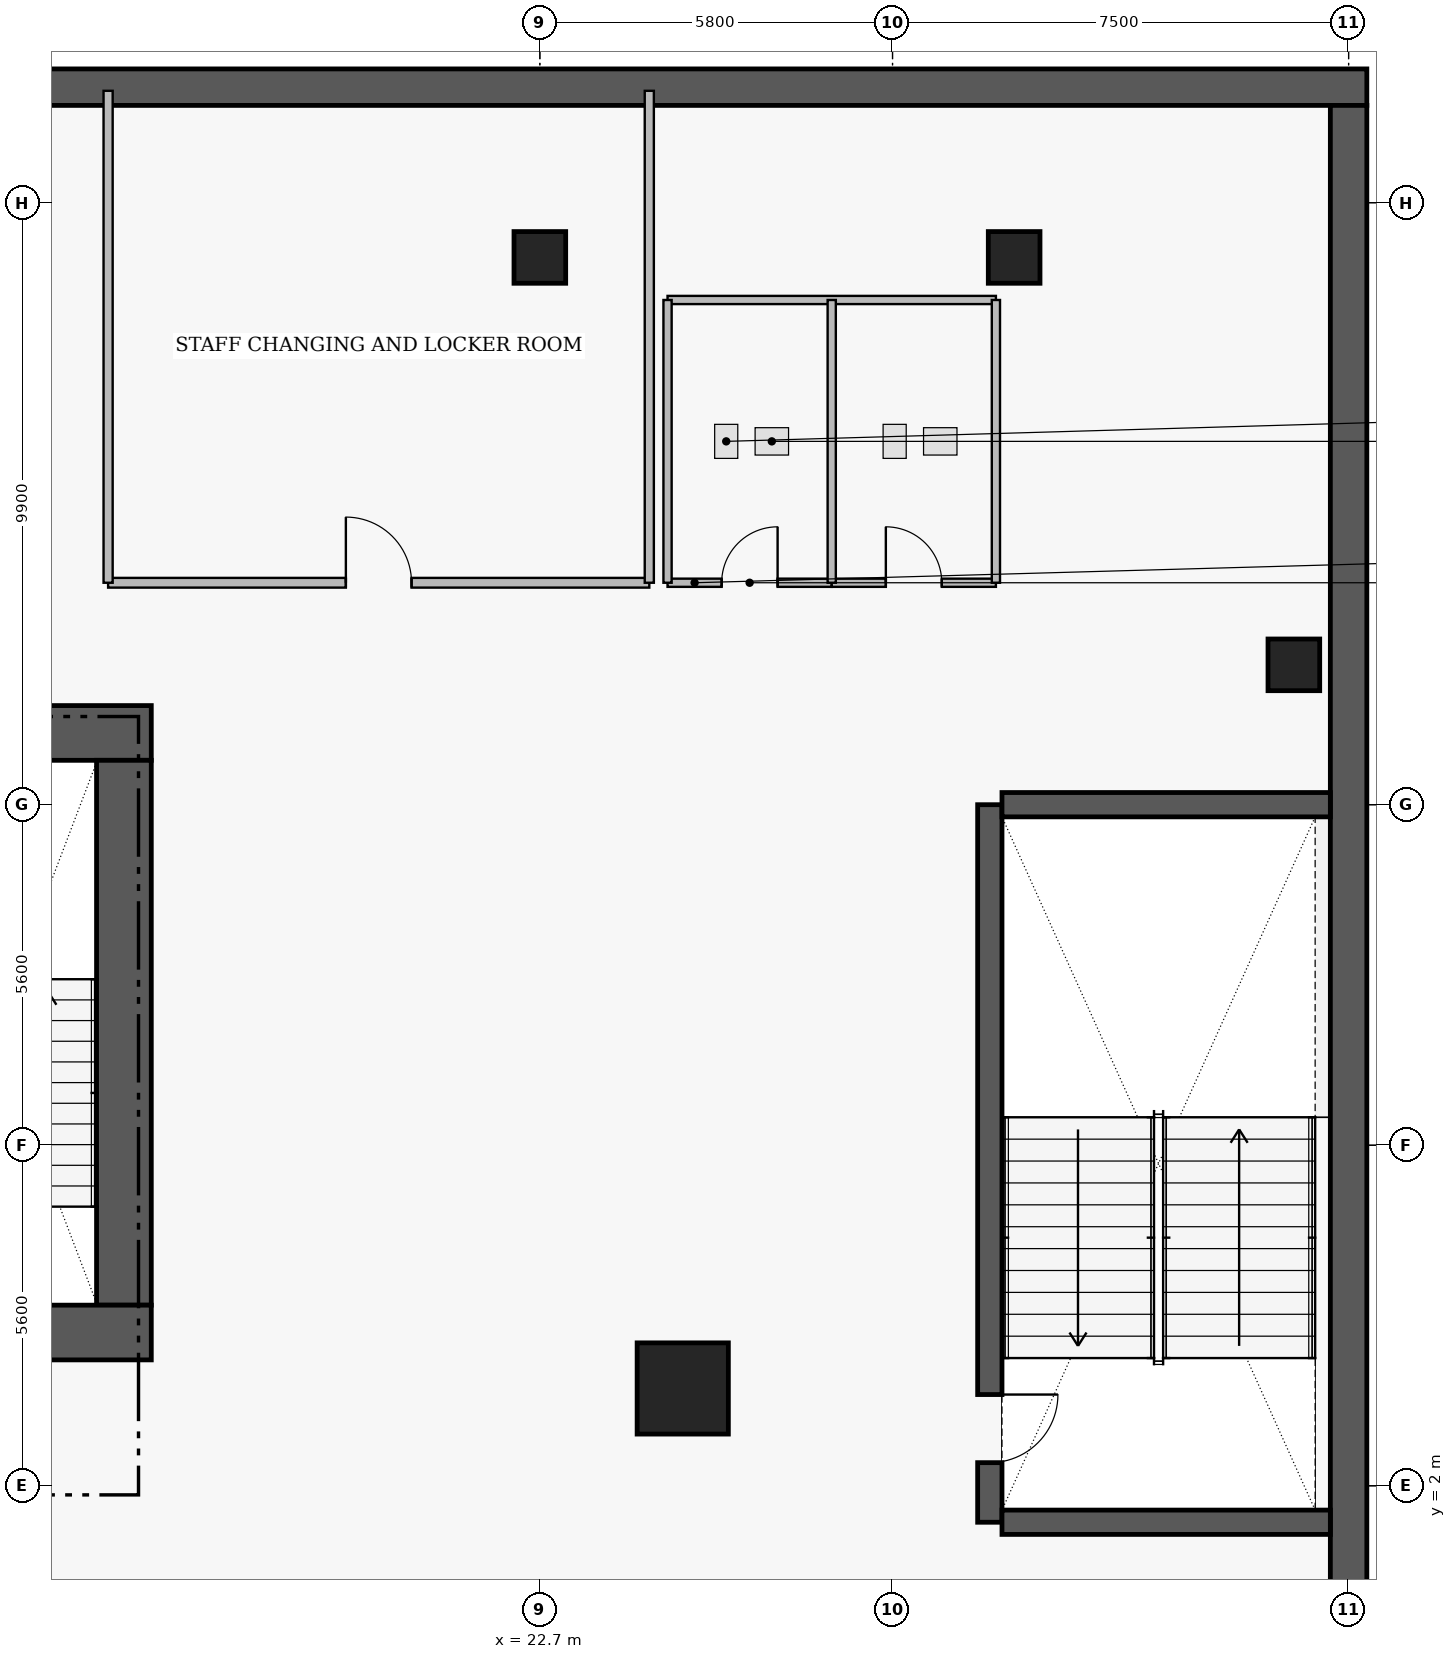
"""IFC4 building model, lengths in metres.
Left out: names, types, materials, properties, quantities, classifications, styles, units other than length and angle.
Written with IfcOpenShell. Run it as: python <this file> out.ifc"""

import sys

from ifc_helpers import new_model, si_unit, direction, frame, frame_2d, origin, origin_2d, place, context, subcontext, project, spatial, rectangle, extrude, element, fill, save


model = new_model("IFC4")
c1 = context("Model", 3, precision=1e-05, world=origin(), true_north=direction((0.0, 1.0)))
c2 = subcontext(c1, "Body", "Model", "MODEL_VIEW")
j1 = project(units=[si_unit("LENGTHUNIT", "METRE"), si_unit("PLANEANGLEUNIT", "RADIAN")], contexts=[c1])
p1 = place(None, origin())
s1 = spatial("IfcSite", under=j1, at=p1, CompositionType="ELEMENT")
p2 = place(p1, origin())
s2 = spatial("IfcBuilding", under=s1, at=p2, CompositionType="ELEMENT")
p3 = place(p2, frame((0.0, 0.0, -4.5)))
s3 = spatial("IfcBuildingStorey", under=s2, at=p3, CompositionType="ELEMENT", Elevation=-4.5)
p4 = place(p3, frame((-36.3, 25.0, 0.0), z_axis=(0.0, 0.0, 1.0), x_axis=(1.0, 0.0, 0.0)))
e1 = element("IfcWall", 1, at=p4, inside=s3, PredefinedType="USERDEFINED", context=c2, shape_type="SweptSolid", body=[
    extrude(rectangle(XDim=72.6, YDim=0.6, at=frame_2d((36.3, 0.0))), origin(), (0.0, 0.0, 1.0), 4.24),
])
p5 = place(p3, frame((36.0, 24.7, 0.0), z_axis=(0.0, 0.0, 1.0), x_axis=(0.0, -1.0, 0.0)))
e2 = element("IfcWall", 2, at=p5, inside=s3, PredefinedType="USERDEFINED", context=c2, shape_type="SweptSolid", body=[
    extrude(rectangle(XDim=48.4, YDim=0.6, at=frame_2d((24.2, 0.0))), origin(), (0.0, 0.0, 1.0), 4.24),
])
p6 = place(p3, frame((11.6, 14.38, 0.0), z_axis=(0.0, 0.0, 1.0), x_axis=(1.0, 0.0, 0.0)))
e3 = element("IfcWall", 3, at=p6, inside=s3, PredefinedType="SHEAR", context=c2, shape_type="SweptSolid", body=[
    extrude(rectangle(XDim=4.71, YDim=0.9, at=frame_2d((2.355, 0.0))), origin(), (0.0, 0.0, 1.0), 4.31),
])
p7 = place(p3, frame((15.86, 4.97, 0.0), z_axis=(0.0, 0.0, 1.0), x_axis=(0.0, 1.0, 0.0)))
e4 = element("IfcWall", 4, at=p7, inside=s3, PredefinedType="SHEAR", context=c2, shape_type="SweptSolid", body=[
    extrude(rectangle(XDim=8.96, YDim=0.9, at=frame_2d((4.48, 0.0))), origin(), (0.0, 0.0, 1.0), 4.31),
])
p8 = place(p3, frame((11.6, 4.52, 0.0), z_axis=(0.0, 0.0, 1.0), x_axis=(1.0, 0.0, 0.0)))
e5 = element("IfcWall", 5, at=p8, inside=s3, PredefinedType="SHEAR", context=c2, shape_type="SweptSolid", body=[
    extrude(rectangle(XDim=4.71, YDim=0.9, at=frame_2d((2.355, 0.0))), origin(), (0.0, 0.0, 1.0), 4.31),
])
p9 = place(p3, frame((30.1, 13.2, 0.0), z_axis=(0.0, 0.0, 1.0), x_axis=(0.0, -1.0, 0.0)))
e6 = element("IfcWall", 6, at=p9, inside=s3, PredefinedType="SHEAR", context=c2, shape_type="SweptSolid", body=[
    extrude(rectangle(XDim=11.8, YDim=0.4, at=frame_2d((5.9, 0.0))), origin(), (0.0, 0.0, 1.0), 4.31),
])
p10 = place(p9, frame((9.7, 0.0, 0.0)))
e7 = element("IfcOpeningElement", 7, at=p10, cuts=e6, PredefinedType="OPENING", context=c2, shape_type="SweptSolid", body=[
    extrude(rectangle(XDim=1.12, YDim=2.22, at=frame_2d((0.56, 1.11))), frame((0.0, 0.21, 0.0), z_axis=(0.0, -1.0, 0.0), x_axis=(1.0, 0.0, 0.0)), (0.0, 0.0, 1.0), 0.42),
])
for number, where, z_axis, x_axis in (
    (8, (30.3, 1.4, 0.0), (0.0, 0.0, 1.0), (1.0, 0.0, 0.0)),
    (9, (30.3, 13.2, 0.0), (0.0, 0.0, 1.0), (1.0, 0.0, 0.0)),
):
    element("IfcWall", number, at=place(p3, frame(where, z_axis=z_axis, x_axis=x_axis)), inside=s3, PredefinedType="SHEAR", context=c2, shape_type="SweptSolid", body=[
        extrude(rectangle(XDim=5.4, YDim=0.4, at=frame_2d((2.7, 0.0))), origin(), (0.0, 0.0, 1.0), 4.31),
    ])
p11 = place(p3, frame((25.05, 3.6, 0.0), z_axis=(0.0, 0.0, 1.0), x_axis=(1.0, 0.0, 0.0)))
e10 = element("IfcColumn", 10, at=p11, inside=s3, PredefinedType="COLUMN", context=c2, shape_type="SweptSolid", body=[
    extrude(rectangle(XDim=1.5, YDim=1.5, at=origin_2d()), origin(), (0.0, 0.0, 1.0), 4.5),
])
for number, where, z_axis, x_axis in (
    (11, (30.5, 22.2, 0.0), (0.0, 0.0, 1.0), (1.0, 0.0, 0.0)),
    (12, (35.1, 15.5, 0.0), (0.0, 0.0, 1.0), (1.0, 0.0, 0.0)),
    (13, (22.7, 22.2, 0.0), (0.0, 0.0, 1.0), (1.0, 0.0, 0.0)),
):
    element("IfcColumn", number, at=place(p3, frame(where, z_axis=z_axis, x_axis=x_axis)), inside=s3, PredefinedType="COLUMN", context=c2, shape_type="SweptSolid", body=[
        extrude(rectangle(XDim=0.85, YDim=0.85, at=origin_2d()), origin(), (0.0, 0.0, 1.0), 4.5),
    ])
p12 = place(p3, frame((15.6, 16.85, 0.0), z_axis=(0.0, 0.0, 1.0), x_axis=(1.0, 0.0, 0.0)))
e14 = element("IfcWall", 14, at=p12, inside=s3, PredefinedType="PARTITIONING", context=c2, shape_type="SweptSolid", body=[
    extrude(rectangle(XDim=8.9, YDim=0.16, at=frame_2d((4.45, 0.0))), origin(), (0.0, 0.0, 1.0), 4.24),
])
p13 = place(p12, frame((3.91, 0.0, 0.0)))
e15 = element("IfcOpeningElement", 15, at=p13, cuts=e14, PredefinedType="OPENING", context=c2, shape_type="SweptSolid", body=[
    extrude(rectangle(XDim=1.08, YDim=2.18, at=frame_2d((0.54, 1.09))), frame((0.0, 0.09, 0.0), z_axis=(0.0, -1.0, 0.0), x_axis=(1.0, 0.0, 0.0)), (0.0, 0.0, 1.0), 0.18),
])
p14 = place(p3, frame((24.8, 16.85, 0.0), z_axis=(0.0, 0.0, 1.0), x_axis=(1.0, 0.0, 0.0)))
e16 = element("IfcWall", 16, at=p14, inside=s3, PredefinedType="PLUMBINGWALL", context=c2, shape_type="SweptSolid", body=[
    extrude(rectangle(XDim=2.7, YDim=0.135, at=frame_2d((1.35, 0.0))), origin(), (0.0, 0.0, 1.0), 4.24),
])
p15 = place(p14, frame((0.89, 0.0, 0.0)))
e17 = element("IfcOpeningElement", 17, at=p15, cuts=e16, PredefinedType="OPENING", context=c2, shape_type="SweptSolid", body=[
    extrude(rectangle(XDim=0.92, YDim=2.12, at=frame_2d((0.46, 1.06))), frame((0.0, 0.077, 0.0), z_axis=(0.0, -1.0, 0.0), x_axis=(1.0, 0.0, 0.0)), (0.0, 0.0, 1.0), 0.155),
])
p16 = place(p3, frame((27.5, 16.85, 0.0), z_axis=(0.0, 0.0, 1.0), x_axis=(1.0, 0.0, 0.0)))
e18 = element("IfcWall", 18, at=p16, inside=s3, PredefinedType="PLUMBINGWALL", context=c2, shape_type="SweptSolid", body=[
    extrude(rectangle(XDim=2.7, YDim=0.135, at=frame_2d((1.35, 0.0))), origin(), (0.0, 0.0, 1.0), 4.24),
])
p17 = place(p16, frame((0.89, 0.0, 0.0)))
e19 = element("IfcOpeningElement", 19, at=p17, cuts=e18, PredefinedType="OPENING", context=c2, shape_type="SweptSolid", body=[
    extrude(rectangle(XDim=0.92, YDim=2.12, at=frame_2d((0.46, 1.06))), frame((0.0, 0.077, 0.0), z_axis=(0.0, -1.0, 0.0), x_axis=(1.0, 0.0, 0.0)), (0.0, 0.0, 1.0), 0.155),
])
for number, where, z_axis, x_axis in (
    (20, (15.6, 16.85, 0.0), (0.0, 0.0, 1.0), (0.0, 1.0, 0.0)),
    (21, (24.5, 16.85, 0.0), (0.0, 0.0, 1.0), (0.0, 1.0, 0.0)),
):
    element("IfcWall", number, at=place(p3, frame(where, z_axis=z_axis, x_axis=x_axis)), inside=s3, PredefinedType="PARTITIONING", context=c2, shape_type="SweptSolid", body=[
        extrude(rectangle(XDim=8.09, YDim=0.15, at=frame_2d((4.045, 0.0))), origin(), (0.0, 0.0, 1.0), 4.24),
    ])
p18 = place(p3, frame((24.8, 21.5, 0.0), z_axis=(0.0, 0.0, 1.0), x_axis=(1.0, 0.0, 0.0)))
e22 = element("IfcWall", 22, at=p18, inside=s3, PredefinedType="PLUMBINGWALL", context=c2, shape_type="SweptSolid", body=[
    extrude(rectangle(XDim=5.4, YDim=0.135, at=frame_2d((2.7, 0.0))), origin(), (0.0, 0.0, 1.0), 4.24),
])
for number, where, z_axis, x_axis in (
    (23, (24.8, 16.85, 0.0), (0.0, 0.0, 1.0), (0.0, 1.0, 0.0)),
    (24, (30.2, 16.85, 0.0), (0.0, 0.0, 1.0), (0.0, 1.0, 0.0)),
    (25, (27.5, 16.85, 0.0), (0.0, 0.0, 1.0), (0.0, 1.0, 0.0)),
):
    element("IfcWall", number, at=place(p3, frame(where, z_axis=z_axis, x_axis=x_axis)), inside=s3, PredefinedType="PLUMBINGWALL", context=c2, shape_type="SweptSolid", body=[
        extrude(rectangle(XDim=4.65, YDim=0.135, at=frame_2d((2.325, 0.0))), origin(), (0.0, 0.0, 1.0), 4.24),
    ])
p19 = place(p10, origin())
e26 = element("IfcDoor", 26, at=p19, inside=s3, OperationType="SINGLE_SWING_LEFT", PredefinedType="DOOR", context=c2, shape_type="SweptSolid", body=[
    extrude(rectangle(XDim=1.12, YDim=2.22, at=frame_2d((0.56, 1.11))), frame((0.0, 0.025, 0.0), z_axis=(0.0, -1.0, 0.0), x_axis=(1.0, 0.0, 0.0)), (0.0, 0.0, 1.0), 0.05),
])
fill(e7, e26)
p20 = place(p13, origin())
e27 = element("IfcDoor", 27, at=p20, inside=s3, OperationType="SINGLE_SWING_LEFT", PredefinedType="DOOR", context=c2, shape_type="SweptSolid", body=[
    extrude(rectangle(XDim=1.08, YDim=2.18, at=frame_2d((0.54, 1.09))), frame((0.0, 0.025, 0.0), z_axis=(0.0, -1.0, 0.0), x_axis=(1.0, 0.0, 0.0)), (0.0, 0.0, 1.0), 0.05),
])
fill(e15, e27)
p21 = place(p15, origin())
e28 = element("IfcDoor", 28, at=p21, inside=s3, OperationType="SINGLE_SWING_RIGHT", PredefinedType="DOOR", context=c2, shape_type="SweptSolid", body=[
    extrude(rectangle(XDim=0.92, YDim=2.12, at=frame_2d((0.46, 1.06))), frame((0.0, 0.025, 0.0), z_axis=(0.0, -1.0, 0.0), x_axis=(1.0, 0.0, 0.0)), (0.0, 0.0, 1.0), 0.05),
])
fill(e17, e28)
p22 = place(p17, origin())
e29 = element("IfcDoor", 29, at=p22, inside=s3, OperationType="SINGLE_SWING_LEFT", PredefinedType="DOOR", context=c2, shape_type="SweptSolid", body=[
    extrude(rectangle(XDim=0.92, YDim=2.12, at=frame_2d((0.46, 1.06))), frame((0.0, 0.025, 0.0), z_axis=(0.0, -1.0, 0.0), x_axis=(1.0, 0.0, 0.0)), (0.0, 0.0, 1.0), 0.05),
])
fill(e19, e29)
save(model, sys.argv[1])
